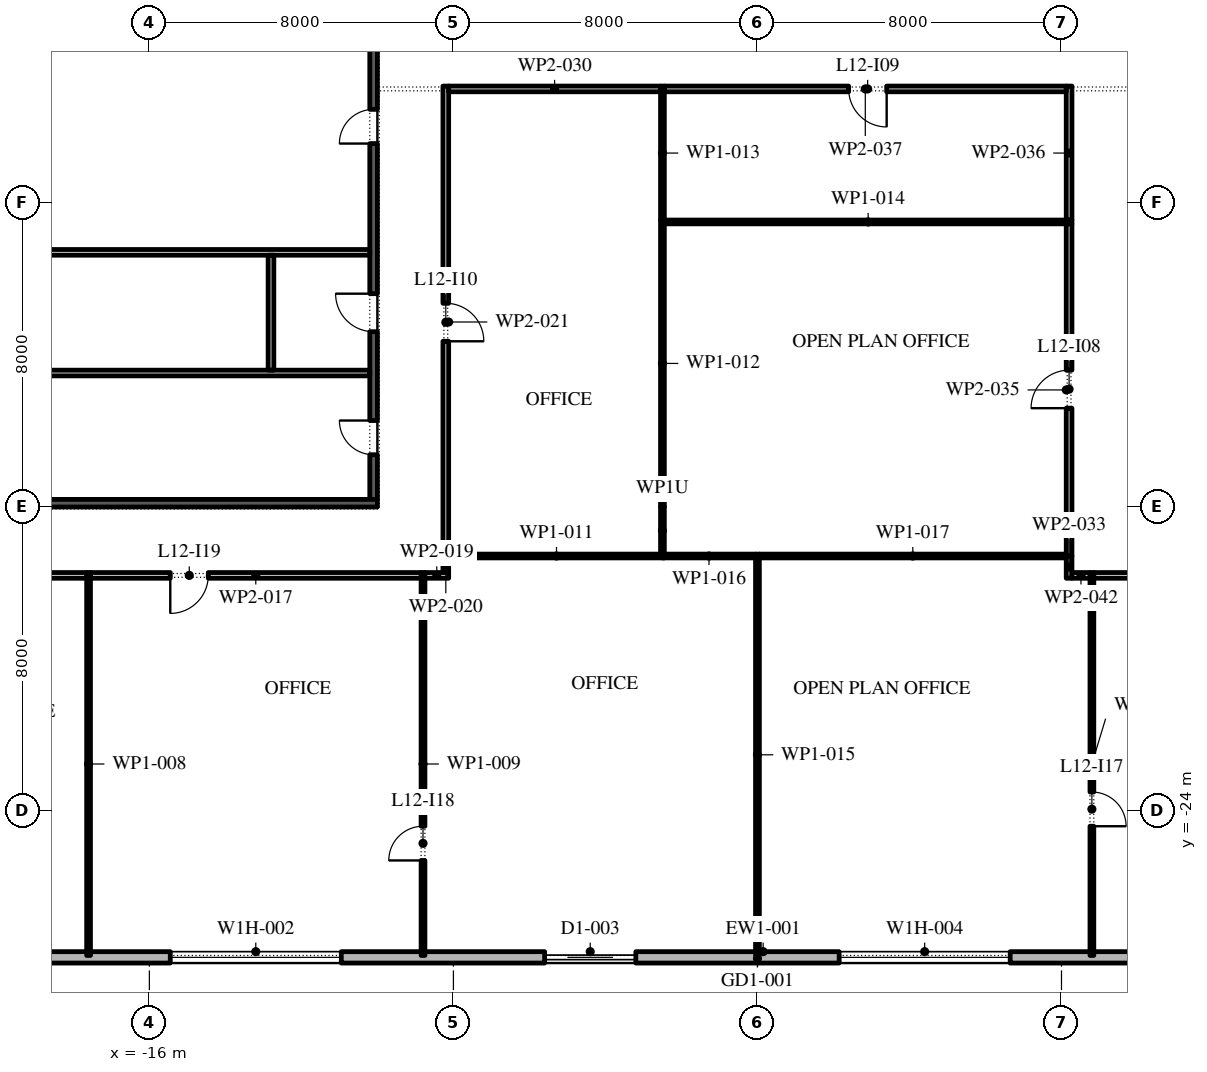
"""IFC4 building model, lengths in metres.
Left out: names, types, materials, properties, quantities, classifications, styles, units other than length and angle.
Written with IfcOpenShell. Run it as: python <this file> out.ifc"""

import sys

from ifc_helpers import new_model, si_unit, direction, frame, frame_2d, origin, place, context, subcontext, project, spatial, rectangle, extrude, element, fill, save


model = new_model("IFC4")
c1 = context("Model", 3, precision=1e-05, world=origin(), true_north=direction((0.0, 1.0)))
c2 = subcontext(c1, "Body", "Model", "MODEL_VIEW")
j1 = project(units=[si_unit("LENGTHUNIT", "METRE"), si_unit("PLANEANGLEUNIT", "RADIAN")], contexts=[c1])
p1 = place(None, origin())
s1 = spatial("IfcSite", under=j1, at=p1, CompositionType="ELEMENT")
p2 = place(p1, origin())
s2 = spatial("IfcBuilding", under=s1, at=p2, CompositionType="ELEMENT")
p3 = place(p2, frame((0.0, 0.0, 60.6)))
s3 = spatial("IfcBuildingStorey", under=s2, at=p3, CompositionType="ELEMENT", Elevation=60.6)
p4 = place(p3, frame((-26.1, -27.85, 0.0), z_axis=(0.0, 0.0, 1.0), x_axis=(1.0, 0.0, 0.0)))
e1 = element("IfcWall", 1, at=p4, inside=s3, PredefinedType="STANDARD", context=c2, shape_type="SweptSolid", body=[
    extrude(rectangle(XDim=52.5, YDim=0.3, at=frame_2d((26.25, 0.0))), origin(), (0.0, 0.0, 1.0), 4.0),
])
p5 = place(p4, frame((2.0, 0.0, 0.45)))
e2 = element("IfcOpeningElement", 2, at=p5, cuts=e1, PredefinedType="OPENING", context=c2, shape_type="SweptSolid", body=[
    extrude(rectangle(XDim=4.5, YDim=2.75, at=frame_2d((2.25, 1.375))), frame((0.0, 0.16, 0.0), z_axis=(0.0, -1.0, 0.0), x_axis=(1.0, 0.0, 0.0)), (0.0, 0.0, 1.0), 0.32),
])
p6 = place(p4, frame((10.65, 0.0, 0.45)))
e3 = element("IfcOpeningElement", 3, at=p6, cuts=e1, PredefinedType="OPENING", context=c2, shape_type="SweptSolid", body=[
    extrude(rectangle(XDim=4.5, YDim=2.75, at=frame_2d((2.25, 1.375))), frame((0.0, 0.16, 0.0), z_axis=(0.0, -1.0, 0.0), x_axis=(1.0, 0.0, 0.0)), (0.0, 0.0, 1.0), 0.32),
])
p7 = place(p4, frame((20.5, 0.0, 0.0)))
e4 = element("IfcOpeningElement", 4, at=p7, cuts=e1, PredefinedType="OPENING", context=c2, shape_type="SweptSolid", body=[
    extrude(rectangle(XDim=2.4, YDim=3.5, at=frame_2d((1.2, 1.75))), frame((0.0, 0.16, 0.0), z_axis=(0.0, -1.0, 0.0), x_axis=(1.0, 0.0, 0.0)), (0.0, 0.0, 1.0), 0.32),
])
p8 = place(p4, frame((28.25, 0.0, 0.45)))
e5 = element("IfcOpeningElement", 5, at=p8, cuts=e1, PredefinedType="OPENING", context=c2, shape_type="SweptSolid", body=[
    extrude(rectangle(XDim=4.5, YDim=2.75, at=frame_2d((2.25, 1.375))), frame((0.0, 0.16, 0.0), z_axis=(0.0, -1.0, 0.0), x_axis=(1.0, 0.0, 0.0)), (0.0, 0.0, 1.0), 0.32),
])
p9 = place(p4, frame((37.05, 0.0, 0.45)))
e6 = element("IfcOpeningElement", 6, at=p9, cuts=e1, PredefinedType="OPENING", context=c2, shape_type="SweptSolid", body=[
    extrude(rectangle(XDim=4.5, YDim=2.75, at=frame_2d((2.25, 1.375))), frame((0.0, 0.16, 0.0), z_axis=(0.0, -1.0, 0.0), x_axis=(1.0, 0.0, 0.0)), (0.0, 0.0, 1.0), 0.32),
])
p10 = place(p4, frame((45.85, 0.0, 0.45)))
e7 = element("IfcOpeningElement", 7, at=p10, cuts=e1, PredefinedType="OPENING", context=c2, shape_type="SweptSolid", body=[
    extrude(rectangle(XDim=4.5, YDim=2.75, at=frame_2d((2.25, 1.375))), frame((0.0, 0.16, 0.0), z_axis=(0.0, -1.0, 0.0), x_axis=(1.0, 0.0, 0.0)), (0.0, 0.0, 1.0), 0.32),
])
p11 = place(p3, frame((-10.1, -15.8, 0.0), z_axis=(0.0, 0.0, 1.0), x_axis=(0.0, 1.0, 0.0)))
e8 = element("IfcWall", 8, at=p11, inside=s3, PredefinedType="SHEAR", context=c2, shape_type="SweptSolid", body=[
    extrude(rectangle(XDim=13.05, YDim=0.2, at=frame_2d((6.525, 0.0))), origin(), (0.0, 0.0, 1.0), 4.0),
])
p12 = place(p11, frame((1.175, 0.0, 0.0)))
e9 = element("IfcOpeningElement", 9, at=p12, cuts=e8, PredefinedType="OPENING", context=c2, shape_type="SweptSolid", body=[
    extrude(rectangle(XDim=0.9, YDim=2.1, at=frame_2d((0.45, 1.05))), frame((0.0, 0.11, 0.0), z_axis=(0.0, -1.0, 0.0), x_axis=(1.0, 0.0, 0.0)), (0.0, 0.0, 1.0), 0.22),
])
p13 = place(p11, frame((4.413, 0.0, 0.0)))
e10 = element("IfcOpeningElement", 10, at=p13, cuts=e8, PredefinedType="OPENING", context=c2, shape_type="SweptSolid", body=[
    extrude(rectangle(XDim=1.0, YDim=2.1, at=frame_2d((0.5, 1.05))), frame((0.0, 0.11, 0.0), z_axis=(0.0, -1.0, 0.0), x_axis=(1.0, 0.0, 0.0)), (0.0, 0.0, 1.0), 0.22),
])
p14 = place(p11, frame((9.363, 0.0, 0.0)))
e11 = element("IfcOpeningElement", 11, at=p14, cuts=e8, PredefinedType="OPENING", context=c2, shape_type="SweptSolid", body=[
    extrude(rectangle(XDim=0.9, YDim=2.1, at=frame_2d((0.45, 1.05))), frame((0.0, 0.11, 0.0), z_axis=(0.0, -1.0, 0.0), x_axis=(1.0, 0.0, 0.0)), (0.0, 0.0, 1.0), 0.22),
])
p15 = place(p3, frame((-22.0, -15.9, 0.0), z_axis=(0.0, 0.0, 1.0), x_axis=(1.0, 0.0, 0.0)))
e12 = element("IfcWall", 12, at=p15, inside=s3, PredefinedType="SHEAR", context=c2, shape_type="SweptSolid", body=[
    extrude(rectangle(XDim=12.0, YDim=0.2, at=frame_2d((6.0, 0.0))), origin(), (0.0, 0.0, 1.0), 4.0),
])
for number, where, z_axis, x_axis in (
    (13, (-21.8, -9.3, 0.0), (0.0, 0.0, 1.0), (1.0, 0.0, 0.0)),
    (14, (-21.8, -12.475, 0.0), (0.0, 0.0, 1.0), (1.0, 0.0, 0.0)),
):
    element("IfcWall", number, at=place(p3, frame(where, z_axis=z_axis, x_axis=x_axis)), inside=s3, PredefinedType="PARTITIONING", context=c2, shape_type="SweptSolid", body=[
        extrude(rectangle(XDim=11.6, YDim=0.15, at=frame_2d((5.8, 0.0))), origin(), (0.0, 0.0, 1.0), 4.0),
    ])
p16 = place(p3, frame((-12.8, -12.4, 0.0), z_axis=(0.0, 0.0, 1.0), x_axis=(0.0, 1.0, 0.0)))
e15 = element("IfcWall", 15, at=p16, inside=s3, PredefinedType="PARTITIONING", context=c2, shape_type="SweptSolid", body=[
    extrude(rectangle(XDim=3.025, YDim=0.15, at=frame_2d((1.512, 0.0))), origin(), (0.0, 0.0, 1.0), 4.0),
])
p17 = place(p3, frame((-17.6, -27.8, 0.0), z_axis=(0.0, 0.0, 1.0), x_axis=(0.0, 1.0, 0.0)))
e16 = element("IfcWall", 16, at=p17, inside=s3, PredefinedType="PARTITIONING", context=c2, shape_type="SweptSolid", body=[
    extrude(rectangle(XDim=10.075, YDim=0.1, at=frame_2d((5.038, 0.0))), origin(), (0.0, 0.0, 1.0), 4.0),
])
p18 = place(p3, frame((-17.65, -17.8, 0.0), z_axis=(0.0, 0.0, 1.0), x_axis=(-1.0, 0.0, 0.0)))
e17 = element("IfcWall", 17, at=p18, inside=s3, PredefinedType="PARTITIONING", context=c2, shape_type="SweptSolid", body=[
    extrude(rectangle(XDim=6.075, YDim=0.15, at=frame_2d((3.038, 0.0))), origin(), (0.0, 0.0, 1.0), 4.0),
])
p19 = place(p18, frame((2.5, 0.0, 0.0)))
e18 = element("IfcOpeningElement", 18, at=p19, cuts=e17, PredefinedType="OPENING", context=c2, shape_type="SweptSolid", body=[
    extrude(rectangle(XDim=1.0, YDim=2.1, at=frame_2d((0.5, 1.05))), frame((0.0, 0.085, 0.0), z_axis=(0.0, -1.0, 0.0), x_axis=(1.0, 0.0, 0.0)), (0.0, 0.0, 1.0), 0.17),
])
p20 = place(p3, frame((-8.8, -27.8, 0.0), z_axis=(0.0, 0.0, 1.0), x_axis=(0.0, 1.0, 0.0)))
e19 = element("IfcWall", 19, at=p20, inside=s3, PredefinedType="PARTITIONING", context=c2, shape_type="SweptSolid", body=[
    extrude(rectangle(XDim=10.075, YDim=0.1, at=frame_2d((5.038, 0.0))), origin(), (0.0, 0.0, 1.0), 4.0),
])
p21 = place(p20, frame((2.5, 0.0, 0.0)))
e20 = element("IfcOpeningElement", 20, at=p21, cuts=e19, PredefinedType="OPENING", context=c2, shape_type="SweptSolid", body=[
    extrude(rectangle(XDim=0.9, YDim=2.1, at=frame_2d((0.45, 1.05))), frame((0.0, 0.06, 0.0), z_axis=(0.0, -1.0, 0.0), x_axis=(1.0, 0.0, 0.0)), (0.0, 0.0, 1.0), 0.12),
])
p22 = place(p3, frame((-8.85, -17.8, 0.0), z_axis=(0.0, 0.0, 1.0), x_axis=(-1.0, 0.0, 0.0)))
e21 = element("IfcWall", 21, at=p22, inside=s3, PredefinedType="PARTITIONING", context=c2, shape_type="SweptSolid", body=[
    extrude(rectangle(XDim=8.7, YDim=0.15, at=frame_2d((4.35, 0.0))), origin(), (0.0, 0.0, 1.0), 4.0),
])
p23 = place(p22, frame((5.6, 0.0, 0.0)))
e22 = element("IfcOpeningElement", 22, at=p23, cuts=e21, PredefinedType="OPENING", context=c2, shape_type="SweptSolid", body=[
    extrude(rectangle(XDim=1.0, YDim=2.1, at=frame_2d((0.5, 1.05))), frame((0.0, 0.085, 0.0), z_axis=(0.0, -1.0, 0.0), x_axis=(1.0, 0.0, 0.0)), (0.0, 0.0, 1.0), 0.17),
])
p24 = place(p3, frame((-8.125, -17.8, 0.0), z_axis=(0.0, 0.0, 1.0), x_axis=(-1.0, 0.0, 0.0)))
e23 = element("IfcWall", 23, at=p24, inside=s3, PredefinedType="PARTITIONING", context=c2, shape_type="SweptSolid", body=[
    extrude(rectangle(XDim=0.625, YDim=0.15, at=frame_2d((0.312, 0.0))), origin(), (0.0, 0.0, 1.0), 4.0),
])
p25 = place(p3, frame((-8.2, -17.34, 0.0), z_axis=(0.0, 0.0, 1.0), x_axis=(0.0, -1.0, 0.0)))
e24 = element("IfcWall", 24, at=p25, inside=s3, PredefinedType="PARTITIONING", context=c2, shape_type="SweptSolid", body=[
    extrude(rectangle(XDim=0.385, YDim=0.15, at=frame_2d((0.192, 0.0))), origin(), (0.0, 0.0, 1.0), 4.0),
])
p26 = place(p3, frame((-8.2, -4.925, 0.0), z_axis=(0.0, 0.0, 1.0), x_axis=(0.0, -1.0, 0.0)))
e25 = element("IfcWall", 25, at=p26, inside=s3, PredefinedType="PARTITIONING", context=c2, shape_type="SweptSolid", body=[
    extrude(rectangle(XDim=12.415, YDim=0.15, at=frame_2d((6.208, 0.0))), origin(), (0.0, 0.0, 1.0), 4.0),
])
p27 = place(p26, frame((5.715, 0.0, 0.0)))
e26 = element("IfcOpeningElement", 26, at=p27, cuts=e25, PredefinedType="OPENING", context=c2, shape_type="SweptSolid", body=[
    extrude(rectangle(XDim=1.0, YDim=2.1, at=frame_2d((0.5, 1.05))), frame((0.0, 0.085, 0.0), z_axis=(0.0, -1.0, 0.0), x_axis=(1.0, 0.0, 0.0)), (0.0, 0.0, 1.0), 0.17),
])
p28 = place(p3, frame((-2.45, -17.29, 0.0), z_axis=(0.0, 0.0, 1.0), x_axis=(-1.0, 0.0, 0.0)))
e27 = element("IfcWall", 27, at=p28, inside=s3, PredefinedType="PARTITIONING", context=c2, shape_type="SweptSolid", body=[
    extrude(rectangle(XDim=5.675, YDim=0.1, at=frame_2d((2.837, 0.0))), origin(), (0.0, 0.0, 1.0), 4.0),
])
p29 = place(p3, frame((-2.5, -17.24, 0.0), z_axis=(0.0, 0.0, 1.0), x_axis=(0.0, 1.0, 0.0)))
e28 = element("IfcWall", 28, at=p29, inside=s3, PredefinedType="PARTITIONING", context=c2, shape_type="SweptSolid", body=[
    extrude(rectangle(XDim=1.245, YDim=0.1, at=frame_2d((0.623, 0.0))), origin(), (0.0, 0.0, 1.0), 3.322),
])
p30 = place(p3, frame((-2.5, -8.45, 0.0), z_axis=(0.0, 0.0, 1.0), x_axis=(0.0, 1.0, 0.0)))
e29 = element("IfcWall", 29, at=p30, inside=s3, PredefinedType="PARTITIONING", context=c2, shape_type="SweptSolid", body=[
    extrude(rectangle(XDim=3.525, YDim=0.1, at=frame_2d((1.762, 0.0))), origin(), (0.0, 0.0, 1.0), 4.0),
])
p31 = place(p3, frame((-2.45, -8.5, 0.0), z_axis=(0.0, 0.0, 1.0), x_axis=(1.0, 0.0, 0.0)))
e30 = element("IfcWall", 30, at=p31, inside=s3, PredefinedType="PARTITIONING", context=c2, shape_type="SweptSolid", body=[
    extrude(rectangle(XDim=10.725, YDim=0.1, at=frame_2d((5.362, 0.0))), origin(), (0.0, 0.0, 1.0), 4.0),
])
p32 = place(p3, frame((-2.55, -5.0, 0.0), z_axis=(0.0, 0.0, 1.0), x_axis=(-1.0, 0.0, 0.0)))
e31 = element("IfcWall", 31, at=p32, inside=s3, PredefinedType="PARTITIONING", context=c2, shape_type="SweptSolid", body=[
    extrude(rectangle(XDim=5.575, YDim=0.15, at=frame_2d((2.788, 0.0))), origin(), (0.0, 0.0, 1.0), 4.0),
])
p33 = place(p3, frame((0.0, -27.8, 0.0), z_axis=(0.0, 0.0, 1.0), x_axis=(0.0, 1.0, 0.0)))
e32 = element("IfcWall", 32, at=p33, inside=s3, PredefinedType="PARTITIONING", context=c2, shape_type="SweptSolid", body=[
    extrude(rectangle(XDim=10.56, YDim=0.1, at=frame_2d((5.28, 0.0))), origin(), (0.0, 0.0, 1.0), 4.0),
])
p34 = place(p3, frame((-0.05, -17.29, 0.0), z_axis=(0.0, 0.0, 1.0), x_axis=(-1.0, 0.0, 0.0)))
e33 = element("IfcWall", 33, at=p34, inside=s3, PredefinedType="PARTITIONING", context=c2, shape_type="SweptSolid", body=[
    extrude(rectangle(XDim=2.45, YDim=0.1, at=frame_2d((1.225, 0.0))), origin(), (0.0, 0.0, 1.0), 4.0),
])
p35 = place(p3, frame((8.2, -17.875, 0.0), z_axis=(0.0, 0.0, 1.0), x_axis=(0.0, 1.0, 0.0)))
e34 = element("IfcWall", 34, at=p35, inside=s3, PredefinedType="PARTITIONING", context=c2, shape_type="SweptSolid", body=[
    extrude(rectangle(XDim=0.585, YDim=0.15, at=frame_2d((0.292, 0.0))), origin(), (0.0, 0.0, 1.0), 4.0),
])
p36 = place(p3, frame((8.125, -17.29, 0.0), z_axis=(0.0, 0.0, 1.0), x_axis=(-1.0, 0.0, 0.0)))
e35 = element("IfcWall", 35, at=p36, inside=s3, PredefinedType="PARTITIONING", context=c2, shape_type="SweptSolid", body=[
    extrude(rectangle(XDim=8.075, YDim=0.1, at=frame_2d((4.038, 0.0))), origin(), (0.0, 0.0, 1.0), 4.0),
])
p37 = place(p3, frame((8.2, -17.29, 0.0), z_axis=(0.0, 0.0, 1.0), x_axis=(0.0, 1.0, 0.0)))
e36 = element("IfcWall", 36, at=p37, inside=s3, PredefinedType="PARTITIONING", context=c2, shape_type="SweptSolid", body=[
    extrude(rectangle(XDim=8.74, YDim=0.15, at=frame_2d((4.37, 0.0))), origin(), (0.0, 0.0, 1.0), 4.0),
])
p38 = place(p37, frame((3.89, 0.0, 0.0)))
e37 = element("IfcOpeningElement", 37, at=p38, cuts=e36, PredefinedType="OPENING", context=c2, shape_type="SweptSolid", body=[
    extrude(rectangle(XDim=1.0, YDim=2.1, at=frame_2d((0.5, 1.05))), frame((0.0, 0.085, 0.0), z_axis=(0.0, -1.0, 0.0), x_axis=(1.0, 0.0, 0.0)), (0.0, 0.0, 1.0), 0.17),
])
p39 = place(p3, frame((8.2, -8.45, 0.0), z_axis=(0.0, 0.0, 1.0), x_axis=(0.0, 1.0, 0.0)))
e38 = element("IfcWall", 38, at=p39, inside=s3, PredefinedType="PARTITIONING", context=c2, shape_type="SweptSolid", body=[
    extrude(rectangle(XDim=3.525, YDim=0.15, at=frame_2d((1.762, 0.0))), origin(), (0.0, 0.0, 1.0), 4.0),
])
p40 = place(p3, frame((8.125, -5.0, 0.0), z_axis=(0.0, 0.0, 1.0), x_axis=(-1.0, 0.0, 0.0)))
e39 = element("IfcWall", 39, at=p40, inside=s3, PredefinedType="PARTITIONING", context=c2, shape_type="SweptSolid", body=[
    extrude(rectangle(XDim=10.575, YDim=0.15, at=frame_2d((5.288, 0.0))), origin(), (0.0, 0.0, 1.0), 4.0),
])
p41 = place(p40, frame((4.725, 0.0, 0.0)))
e40 = element("IfcOpeningElement", 40, at=p41, cuts=e39, PredefinedType="OPENING", context=c2, shape_type="SweptSolid", body=[
    extrude(rectangle(XDim=1.0, YDim=2.1, at=frame_2d((0.5, 1.05))), frame((0.0, 0.085, 0.0), z_axis=(0.0, -1.0, 0.0), x_axis=(1.0, 0.0, 0.0)), (0.0, 0.0, 1.0), 0.17),
])
p42 = place(p3, frame((8.8, -27.8, 0.0), z_axis=(0.0, 0.0, 1.0), x_axis=(0.0, 1.0, 0.0)))
e41 = element("IfcWall", 41, at=p42, inside=s3, PredefinedType="PARTITIONING", context=c2, shape_type="SweptSolid", body=[
    extrude(rectangle(XDim=10.075, YDim=0.1, at=frame_2d((5.038, 0.0))), origin(), (0.0, 0.0, 1.0), 4.0),
])
p43 = place(p42, frame((3.4, 0.0, 0.0)))
e42 = element("IfcOpeningElement", 42, at=p43, cuts=e41, PredefinedType="OPENING", context=c2, shape_type="SweptSolid", body=[
    extrude(rectangle(XDim=0.9, YDim=2.1, at=frame_2d((0.45, 1.05))), frame((0.0, 0.06, 0.0), z_axis=(0.0, -1.0, 0.0), x_axis=(1.0, 0.0, 0.0)), (0.0, 0.0, 1.0), 0.12),
])
p44 = place(p3, frame((8.75, -17.8, 0.0), z_axis=(0.0, 0.0, 1.0), x_axis=(-1.0, 0.0, 0.0)))
e43 = element("IfcWall", 43, at=p44, inside=s3, PredefinedType="PARTITIONING", context=c2, shape_type="SweptSolid", body=[
    extrude(rectangle(XDim=0.475, YDim=0.15, at=frame_2d((0.238, 0.0))), origin(), (0.0, 0.0, 1.0), 4.0),
])
p45 = place(p3, frame((17.55, -17.8, 0.0), z_axis=(0.0, 0.0, 1.0), x_axis=(-1.0, 0.0, 0.0)))
e44 = element("IfcWall", 44, at=p45, inside=s3, PredefinedType="PARTITIONING", context=c2, shape_type="SweptSolid", body=[
    extrude(rectangle(XDim=8.7, YDim=0.15, at=frame_2d((4.35, 0.0))), origin(), (0.0, 0.0, 1.0), 4.0),
])
p46 = place(p45, frame((4.85, 0.0, 0.0)))
e45 = element("IfcOpeningElement", 45, at=p46, cuts=e44, PredefinedType="OPENING", context=c2, shape_type="SweptSolid", body=[
    extrude(rectangle(XDim=1.0, YDim=2.1, at=frame_2d((0.5, 1.05))), frame((0.0, 0.085, 0.0), z_axis=(0.0, -1.0, 0.0), x_axis=(1.0, 0.0, 0.0)), (0.0, 0.0, 1.0), 0.17),
])
p47 = place(p3, frame((-2.5, -15.995, 0.0), z_axis=(0.0, 0.0, 1.0), x_axis=(0.0, 1.0, 0.0)))
e46 = element("IfcWall", 46, at=p47, inside=s3, PredefinedType="PARTITIONING", context=c2, shape_type="SweptSolid", body=[
    extrude(rectangle(XDim=7.545, YDim=0.1, at=frame_2d((3.772, 0.0))), origin(), (0.0, 0.0, 1.0), 4.0),
])
p48 = place(p6, origin())
e47 = element("IfcWindow", 47, at=p48, inside=s3, PartitioningType="DOUBLE_PANEL_VERTICAL", PredefinedType="WINDOW", context=c2, shape_type="SweptSolid", body=[
    extrude(rectangle(XDim=4.5, YDim=2.75, at=frame_2d((2.25, 1.375))), frame((0.0, 0.03, 0.0), z_axis=(0.0, -1.0, 0.0), x_axis=(1.0, 0.0, 0.0)), (0.0, 0.0, 1.0), 0.06),
])
fill(e3, e47)
p49 = place(p7, origin())
e48 = element("IfcDoor", 48, at=p49, inside=s3, OperationType="DOUBLE_DOOR_SLIDING", PredefinedType="DOOR", context=c2, shape_type="SweptSolid", body=[
    extrude(rectangle(XDim=2.4, YDim=3.5, at=frame_2d((1.2, 1.75))), frame((0.0, 0.025, 0.0), z_axis=(0.0, -1.0, 0.0), x_axis=(1.0, 0.0, 0.0)), (0.0, 0.0, 1.0), 0.05),
])
fill(e4, e48)
p50 = place(p8, origin())
e49 = element("IfcWindow", 49, at=p50, inside=s3, PartitioningType="DOUBLE_PANEL_VERTICAL", PredefinedType="WINDOW", context=c2, shape_type="SweptSolid", body=[
    extrude(rectangle(XDim=4.5, YDim=2.75, at=frame_2d((2.25, 1.375))), frame((0.0, 0.03, 0.0), z_axis=(0.0, -1.0, 0.0), x_axis=(1.0, 0.0, 0.0)), (0.0, 0.0, 1.0), 0.06),
])
fill(e5, e49)
p51 = place(p12, origin())
e50 = element("IfcDoor", 50, at=p51, inside=s3, OperationType="SINGLE_SWING_LEFT", PredefinedType="DOOR", context=c2, shape_type="SweptSolid", body=[
    extrude(rectangle(XDim=0.9, YDim=2.1, at=frame_2d((0.45, 1.05))), frame((0.0, 0.1, 0.0), z_axis=(0.0, -1.0, 0.0), x_axis=(1.0, 0.0, 0.0)), (0.0, 0.0, 1.0), 0.05),
])
fill(e9, e50)
p52 = place(p13, origin())
e51 = element("IfcDoor", 51, at=p52, inside=s3, OperationType="SINGLE_SWING_LEFT", PredefinedType="DOOR", context=c2, shape_type="SweptSolid", body=[
    extrude(rectangle(XDim=1.0, YDim=2.1, at=frame_2d((0.5, 1.05))), frame((0.0, 0.1, 0.0), z_axis=(0.0, -1.0, 0.0), x_axis=(1.0, 0.0, 0.0)), (0.0, 0.0, 1.0), 0.05),
])
fill(e10, e51)
p53 = place(p14, origin())
e52 = element("IfcDoor", 52, at=p53, inside=s3, OperationType="SINGLE_SWING_RIGHT", PredefinedType="DOOR", context=c2, shape_type="SweptSolid", body=[
    extrude(rectangle(XDim=0.9, YDim=2.1, at=frame_2d((0.45, 1.05))), frame((0.0, 0.1, 0.0), z_axis=(0.0, -1.0, 0.0), x_axis=(1.0, 0.0, 0.0)), (0.0, 0.0, 1.0), 0.05),
])
fill(e11, e52)
p54 = place(p38, origin())
e53 = element("IfcDoor", 53, at=p54, inside=s3, OperationType="SINGLE_SWING_RIGHT", PredefinedType="DOOR", context=c2, shape_type="SweptSolid", body=[
    extrude(rectangle(XDim=1.0, YDim=2.1, at=frame_2d((0.5, 1.05))), frame((0.0, 0.025, 0.0), z_axis=(0.0, -1.0, 0.0), x_axis=(1.0, 0.0, 0.0)), (0.0, 0.0, 1.0), 0.05),
])
fill(e37, e53)
p55 = place(p41, origin())
e54 = element("IfcDoor", 54, at=p55, inside=s3, OperationType="SINGLE_SWING_RIGHT", PredefinedType="DOOR", context=c2, shape_type="SweptSolid", body=[
    extrude(rectangle(XDim=1.0, YDim=2.1, at=frame_2d((0.5, 1.05))), frame((0.0, 0.025, 0.0), z_axis=(0.0, -1.0, 0.0), x_axis=(1.0, 0.0, 0.0)), (0.0, 0.0, 1.0), 0.05),
])
fill(e40, e54)
p56 = place(p27, origin())
e55 = element("IfcDoor", 55, at=p56, inside=s3, OperationType="SINGLE_SWING_LEFT", PredefinedType="DOOR", context=c2, shape_type="SweptSolid", body=[
    extrude(rectangle(XDim=1.0, YDim=2.1, at=frame_2d((0.5, 1.05))), frame((0.0, 0.025, 0.0), z_axis=(0.0, -1.0, 0.0), x_axis=(1.0, 0.0, 0.0)), (0.0, 0.0, 1.0), 0.05),
])
fill(e26, e55)
p57 = place(p43, frame((0.9, 0.0, 0.0), z_axis=(0.0, 0.0, 1.0), x_axis=(-1.0, 0.0, 0.0)))
e56 = element("IfcDoor", 56, at=p57, inside=s3, OperationType="SINGLE_SWING_LEFT", PredefinedType="DOOR", context=c2, shape_type="SweptSolid", body=[
    extrude(rectangle(XDim=0.9, YDim=2.1, at=frame_2d((0.45, 1.05))), frame((0.0, 0.025, 0.0), z_axis=(0.0, -1.0, 0.0), x_axis=(1.0, 0.0, 0.0)), (0.0, 0.0, 1.0), 0.05),
])
fill(e42, e56)
p58 = place(p21, origin())
e57 = element("IfcDoor", 57, at=p58, inside=s3, OperationType="SINGLE_SWING_RIGHT", PredefinedType="DOOR", context=c2, shape_type="SweptSolid", body=[
    extrude(rectangle(XDim=0.9, YDim=2.1, at=frame_2d((0.45, 1.05))), frame((0.0, 0.025, 0.0), z_axis=(0.0, -1.0, 0.0), x_axis=(1.0, 0.0, 0.0)), (0.0, 0.0, 1.0), 0.05),
])
fill(e20, e57)
p59 = place(p23, origin())
e58 = element("IfcDoor", 58, at=p59, inside=s3, OperationType="SINGLE_SWING_LEFT", PredefinedType="DOOR", context=c2, shape_type="SweptSolid", body=[
    extrude(rectangle(XDim=1.0, YDim=2.1, at=frame_2d((0.5, 1.05))), frame((0.0, 0.025, 0.0), z_axis=(0.0, -1.0, 0.0), x_axis=(1.0, 0.0, 0.0)), (0.0, 0.0, 1.0), 0.05),
])
fill(e22, e58)
save(model, sys.argv[1])
